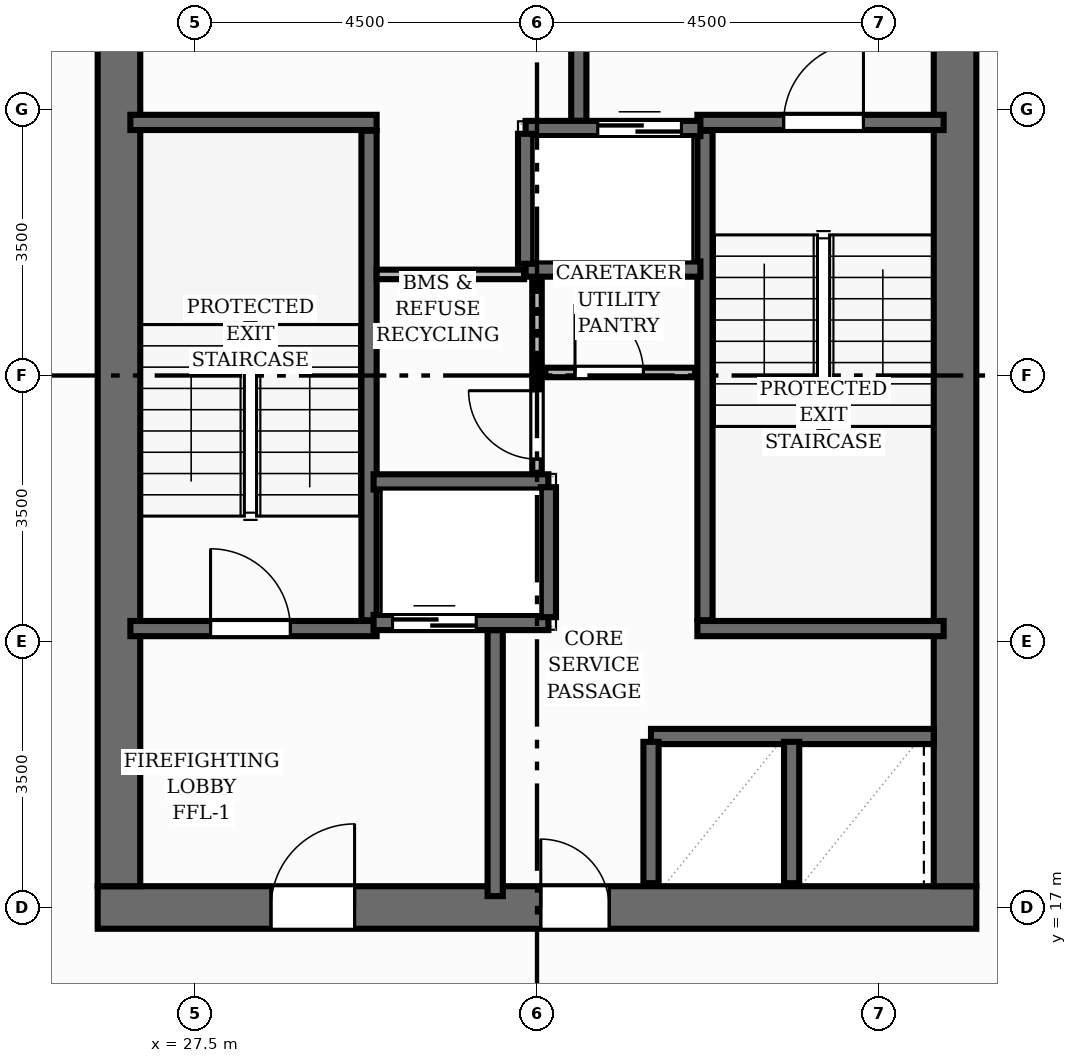
"""IFC4 building model, lengths in metres.
Left out: names, types, materials, properties, quantities, classifications, styles, units other than length and angle.
Written with IfcOpenShell. Run it as: python <this file> out.ifc"""

import sys

from ifc_helpers import new_model, si_unit, direction, frame, frame_2d, origin, place, context, subcontext, project, spatial, rectangle, extrude, element, fill, save


model = new_model("IFC4")
c1 = context("Model", 3, precision=1e-05, world=origin(), true_north=direction((0.0, 1.0)))
c2 = subcontext(c1, "Body", "Model", "MODEL_VIEW")
j1 = project(units=[si_unit("LENGTHUNIT", "METRE"), si_unit("PLANEANGLEUNIT", "RADIAN")], contexts=[c1])
p1 = place(None, origin())
s1 = spatial("IfcSite", under=j1, at=p1, CompositionType="ELEMENT")
p2 = place(p1, origin())
s2 = spatial("IfcBuilding", under=s1, at=p2, CompositionType="ELEMENT")
p3 = place(p2, frame((0.0, 0.0, 169.44)))
s3 = spatial("IfcBuildingStorey", under=s2, at=p3, CompositionType="ELEMENT", Elevation=169.44)
p4 = place(p3, frame((26.22, 17.0, 0.0), z_axis=(0.0, 0.0, 1.0), x_axis=(1.0, 0.0, 0.0)))
e1 = element("IfcWall", 1, at=p4, inside=s3, PredefinedType="SHEAR", context=c2, shape_type="SweptSolid", body=[
    extrude(rectangle(XDim=11.56, YDim=0.56, at=frame_2d((5.78, 0.0))), origin(), (0.0, 0.0, 1.0), 3.2),
])
p5 = place(p4, frame((2.28, 0.0, 0.0)))
e2 = element("IfcOpeningElement", 2, at=p5, cuts=e1, PredefinedType="OPENING", context=c2, shape_type="SweptSolid", body=[
    extrude(rectangle(XDim=1.1, YDim=2.15, at=frame_2d((0.55, 1.075))), frame((0.0, 0.29, 0.0), z_axis=(0.0, -1.0, 0.0), x_axis=(1.0, 0.0, 0.0)), (0.0, 0.0, 1.0), 0.58),
])
p6 = place(p4, frame((5.83, 0.0, 0.0)))
e3 = element("IfcOpeningElement", 3, at=p6, cuts=e1, PredefinedType="OPENING", context=c2, shape_type="SweptSolid", body=[
    extrude(rectangle(XDim=0.9, YDim=2.1, at=frame_2d((0.45, 1.05))), frame((0.0, 0.29, 0.0), z_axis=(0.0, -1.0, 0.0), x_axis=(1.0, 0.0, 0.0)), (0.0, 0.0, 1.0), 0.58),
])
for number, where, z_axis, x_axis in (
    (4, (26.5, 17.28, 0.0), (0.0, 0.0, 1.0), (0.0, 1.0, 0.0)),
    (5, (37.5, 17.28, 0.0), (0.0, 0.0, 1.0), (0.0, 1.0, 0.0)),
):
    element("IfcWall", number, at=place(p3, frame(where, z_axis=z_axis, x_axis=x_axis)), inside=s3, PredefinedType="SHEAR", context=c2, shape_type="SweptSolid", body=[
        extrude(rectangle(XDim=13.44, YDim=0.56, at=frame_2d((6.72, 0.0))), origin(), (0.0, 0.0, 1.0), 3.2),
    ])
p7 = place(p3, frame((29.79, 20.78, 0.0), z_axis=(0.0, 0.0, 1.0), x_axis=(0.0, 1.0, 0.0)))
e6 = element("IfcWall", 6, at=p7, inside=s3, PredefinedType="SHEAR", context=c2, shape_type="SweptSolid", body=[
    extrude(rectangle(XDim=6.44, YDim=0.2, at=frame_2d((3.22, 0.0))), origin(), (0.0, 0.0, 1.0), 3.2),
])
p8 = place(p3, frame((26.65, 27.33, 0.0), z_axis=(0.0, 0.0, 1.0), x_axis=(1.0, 0.0, 0.0)))
e7 = element("IfcWall", 7, at=p8, inside=s3, PredefinedType="SHEAR", context=c2, shape_type="SweptSolid", body=[
    extrude(rectangle(XDim=3.24, YDim=0.2, at=frame_2d((1.62, 0.0))), origin(), (0.0, 0.0, 1.0), 3.2),
])
p9 = place(p3, frame((26.65, 20.67, 0.0), z_axis=(0.0, 0.0, 1.0), x_axis=(1.0, 0.0, 0.0)))
e8 = element("IfcWall", 8, at=p9, inside=s3, PredefinedType="SHEAR", context=c2, shape_type="SweptSolid", body=[
    extrude(rectangle(XDim=3.24, YDim=0.2, at=frame_2d((1.62, 0.0))), origin(), (0.0, 0.0, 1.0), 3.2),
])
p10 = place(p9, frame((1.055, 0.0, 0.0)))
e9 = element("IfcOpeningElement", 9, at=p10, cuts=e8, PredefinedType="OPENING", context=c2, shape_type="SweptSolid", body=[
    extrude(rectangle(XDim=1.05, YDim=2.15, at=frame_2d((0.525, 1.075))), frame((0.0, 0.11, 0.0), z_axis=(0.0, -1.0, 0.0), x_axis=(1.0, 0.0, 0.0)), (0.0, 0.0, 1.0), 0.22),
])
p11 = place(p3, frame((34.21, 20.78, 0.0), z_axis=(0.0, 0.0, 1.0), x_axis=(0.0, 1.0, 0.0)))
e10 = element("IfcWall", 10, at=p11, inside=s3, PredefinedType="SHEAR", context=c2, shape_type="SweptSolid", body=[
    extrude(rectangle(XDim=6.44, YDim=0.2, at=frame_2d((3.22, 0.0))), origin(), (0.0, 0.0, 1.0), 3.2),
])
p12 = place(p3, frame((34.11, 20.67, 0.0), z_axis=(0.0, 0.0, 1.0), x_axis=(1.0, 0.0, 0.0)))
e11 = element("IfcWall", 11, at=p12, inside=s3, PredefinedType="SHEAR", context=c2, shape_type="SweptSolid", body=[
    extrude(rectangle(XDim=3.24, YDim=0.2, at=frame_2d((1.62, 0.0))), origin(), (0.0, 0.0, 1.0), 3.2),
])
p13 = place(p3, frame((34.11, 27.33, 0.0), z_axis=(0.0, 0.0, 1.0), x_axis=(1.0, 0.0, 0.0)))
e12 = element("IfcWall", 12, at=p13, inside=s3, PredefinedType="SHEAR", context=c2, shape_type="SweptSolid", body=[
    extrude(rectangle(XDim=3.24, YDim=0.2, at=frame_2d((1.62, 0.0))), origin(), (0.0, 0.0, 1.0), 3.2),
])
p14 = place(p13, frame((1.135, 0.0, 0.0)))
e13 = element("IfcOpeningElement", 13, at=p14, cuts=e12, PredefinedType="OPENING", context=c2, shape_type="SweptSolid", body=[
    extrude(rectangle(XDim=1.05, YDim=2.15, at=frame_2d((0.525, 1.075))), frame((0.0, 0.11, 0.0), z_axis=(0.0, -1.0, 0.0), x_axis=(1.0, 0.0, 0.0)), (0.0, 0.0, 1.0), 0.22),
])
for number, where, z_axis, x_axis in (
    (14, (31.45, 17.15, 0.0), (0.0, 0.0, 1.0), (0.0, 1.0, 0.0)),
    (15, (32.55, 27.35, 0.0), (0.0, 0.0, 1.0), (0.0, 1.0, 0.0)),
):
    element("IfcWall", number, at=place(p3, frame(where, z_axis=z_axis, x_axis=x_axis)), inside=s3, PredefinedType="SHEAR", context=c2, shape_type="SweptSolid", body=[
        extrude(rectangle(XDim=3.5, YDim=0.2, at=frame_2d((1.75, 0.0))), origin(), (0.0, 0.0, 1.0), 3.2),
    ])
p15 = place(p3, frame((29.85, 20.75, 0.0), z_axis=(0.0, 0.0, 1.0), x_axis=(1.0, 0.0, 0.0)))
e16 = element("IfcWall", 16, at=p15, inside=s3, PredefinedType="SHEAR", context=c2, shape_type="SweptSolid", body=[
    extrude(rectangle(XDim=2.3, YDim=0.2, at=frame_2d((1.15, 0.0))), origin(), (0.0, 0.0, 1.0), 3.2),
])
p16 = place(p15, frame((0.25, 0.0, 0.0)))
e17 = element("IfcOpeningElement", 17, at=p16, cuts=e16, PredefinedType="OPENING", context=c2, shape_type="SweptSolid", body=[
    extrude(rectangle(XDim=1.1, YDim=2.15, at=frame_2d((0.55, 1.075))), frame((0.0, 0.11, 0.0), z_axis=(0.0, -1.0, 0.0), x_axis=(1.0, 0.0, 0.0)), (0.0, 0.0, 1.0), 0.22),
])
p17 = place(p3, frame((29.85, 22.6, 0.0), z_axis=(0.0, 0.0, 1.0), x_axis=(1.0, 0.0, 0.0)))
e18 = element("IfcWall", 18, at=p17, inside=s3, PredefinedType="SHEAR", context=c2, shape_type="SweptSolid", body=[
    extrude(rectangle(XDim=2.3, YDim=0.2, at=frame_2d((1.15, 0.0))), origin(), (0.0, 0.0, 1.0), 3.2),
])
p18 = place(p3, frame((32.15, 20.82, 0.0), z_axis=(0.0, 0.0, 1.0), x_axis=(0.0, 1.0, 0.0)))
e19 = element("IfcWall", 19, at=p18, inside=s3, PredefinedType="SHEAR", context=c2, shape_type="SweptSolid", body=[
    extrude(rectangle(XDim=1.71, YDim=0.2, at=frame_2d((0.855, 0.0))), origin(), (0.0, 0.0, 1.0), 3.2),
])
p19 = place(p3, frame((31.85, 27.25, 0.0), z_axis=(0.0, 0.0, 1.0), x_axis=(1.0, 0.0, 0.0)))
e20 = element("IfcWall", 20, at=p19, inside=s3, PredefinedType="SHEAR", context=c2, shape_type="SweptSolid", body=[
    extrude(rectangle(XDim=2.3, YDim=0.2, at=frame_2d((1.15, 0.0))), origin(), (0.0, 0.0, 1.0), 3.2),
])
p20 = place(p19, frame((0.95, 0.0, 0.0)))
e21 = element("IfcOpeningElement", 21, at=p20, cuts=e20, PredefinedType="OPENING", context=c2, shape_type="SweptSolid", body=[
    extrude(rectangle(XDim=1.1, YDim=2.15, at=frame_2d((0.55, 1.075))), frame((0.0, 0.11, 0.0), z_axis=(0.0, -1.0, 0.0), x_axis=(1.0, 0.0, 0.0)), (0.0, 0.0, 1.0), 0.22),
])
p21 = place(p3, frame((31.85, 25.4, 0.0), z_axis=(0.0, 0.0, 1.0), x_axis=(1.0, 0.0, 0.0)))
e22 = element("IfcWall", 22, at=p21, inside=s3, PredefinedType="SHEAR", context=c2, shape_type="SweptSolid", body=[
    extrude(rectangle(XDim=2.3, YDim=0.2, at=frame_2d((1.15, 0.0))), origin(), (0.0, 0.0, 1.0), 3.2),
])
p22 = place(p3, frame((31.85, 25.47, 0.0), z_axis=(0.0, 0.0, 1.0), x_axis=(0.0, 1.0, 0.0)))
e23 = element("IfcWall", 23, at=p22, inside=s3, PredefinedType="SHEAR", context=c2, shape_type="SweptSolid", body=[
    extrude(rectangle(XDim=1.71, YDim=0.2, at=frame_2d((0.855, 0.0))), origin(), (0.0, 0.0, 1.0), 3.2),
])
p23 = place(p3, frame((33.5, 19.25, 0.0), z_axis=(0.0, 0.0, 1.0), x_axis=(1.0, 0.0, 0.0)))
e24 = element("IfcWall", 24, at=p23, inside=s3, PredefinedType="SHEAR", context=c2, shape_type="SweptSolid", body=[
    extrude(rectangle(XDim=3.72, YDim=0.2, at=frame_2d((1.86, 0.0))), origin(), (0.0, 0.0, 1.0), 3.2),
])
for number, where, z_axis, x_axis in (
    (25, (33.5, 17.32, 0.0), (0.0, 0.0, 1.0), (0.0, 1.0, 0.0)),
    (26, (35.35, 17.32, 0.0), (0.0, 0.0, 1.0), (0.0, 1.0, 0.0)),
):
    element("IfcWall", number, at=place(p3, frame(where, z_axis=z_axis, x_axis=x_axis)), inside=s3, PredefinedType="SHEAR", context=c2, shape_type="SweptSolid", body=[
        extrude(rectangle(XDim=1.86, YDim=0.2, at=frame_2d((0.93, 0.0))), origin(), (0.0, 0.0, 1.0), 3.2),
    ])
p24 = place(p3, frame((32.0, 22.72, 0.0), z_axis=(0.0, 0.0, 1.0), x_axis=(0.0, 1.0, 0.0)))
e27 = element("IfcWall", 27, at=p24, inside=s3, PredefinedType="PARTITIONING", context=c2, shape_type="SweptSolid", body=[
    extrude(rectangle(XDim=2.52, YDim=0.125, at=frame_2d((1.26, 0.0))), origin(), (0.0, 0.0, 1.0), 2.955),
])
p25 = place(p24, frame((0.18, 0.0, 0.0)))
e28 = element("IfcOpeningElement", 28, at=p25, cuts=e27, PredefinedType="OPENING", context=c2, shape_type="SweptSolid", body=[
    extrude(rectangle(XDim=0.9, YDim=2.1, at=frame_2d((0.45, 1.05))), frame((0.0, 0.073, 0.0), z_axis=(0.0, -1.0, 0.0), x_axis=(1.0, 0.0, 0.0)), (0.0, 0.0, 1.0), 0.145),
])
p26 = place(p3, frame((32.11, 24.04, 0.0), z_axis=(0.0, 0.0, 1.0), x_axis=(1.0, 0.0, 0.0)))
e29 = element("IfcWall", 29, at=p26, inside=s3, PredefinedType="PARTITIONING", context=c2, shape_type="SweptSolid", body=[
    extrude(rectangle(XDim=1.97, YDim=0.125, at=frame_2d((0.985, 0.0))), origin(), (0.0, 0.0, 1.0), 2.955),
])
p27 = place(p26, frame((0.39, 0.0, 0.0)))
e30 = element("IfcOpeningElement", 30, at=p27, cuts=e29, PredefinedType="OPENING", context=c2, shape_type="SweptSolid", body=[
    extrude(rectangle(XDim=0.9, YDim=2.1, at=frame_2d((0.45, 1.05))), frame((0.0, 0.073, 0.0), z_axis=(0.0, -1.0, 0.0), x_axis=(1.0, 0.0, 0.0)), (0.0, 0.0, 1.0), 0.145),
])
p28 = place(p3, frame((29.89, 25.33, 0.0), z_axis=(0.0, 0.0, 1.0), x_axis=(1.0, 0.0, 0.0)))
e31 = element("IfcWall", 31, at=p28, inside=s3, PredefinedType="PARTITIONING", context=c2, shape_type="SweptSolid", body=[
    extrude(rectangle(XDim=1.94, YDim=0.125, at=frame_2d((0.97, 0.0))), origin(), (0.0, 0.0, 1.0), 2.955),
])
p29 = place(p10, origin())
e32 = element("IfcDoor", 32, at=p29, inside=s3, OperationType="SINGLE_SWING_LEFT", PredefinedType="DOOR", context=c2, shape_type="SweptSolid", body=[
    extrude(rectangle(XDim=1.05, YDim=2.15, at=frame_2d((0.525, 1.075))), frame((0.0, 0.025, 0.0), z_axis=(0.0, -1.0, 0.0), x_axis=(1.0, 0.0, 0.0)), (0.0, 0.0, 1.0), 0.05),
])
fill(e9, e32)
p30 = place(p14, origin())
e33 = element("IfcDoor", 33, at=p30, inside=s3, OperationType="SINGLE_SWING_RIGHT", PredefinedType="DOOR", context=c2, shape_type="SweptSolid", body=[
    extrude(rectangle(XDim=1.05, YDim=2.15, at=frame_2d((0.525, 1.075))), frame((0.0, 0.025, 0.0), z_axis=(0.0, -1.0, 0.0), x_axis=(1.0, 0.0, 0.0)), (0.0, 0.0, 1.0), 0.05),
])
fill(e13, e33)
p31 = place(p5, origin())
e34 = element("IfcDoor", 34, at=p31, inside=s3, OperationType="SINGLE_SWING_RIGHT", PredefinedType="DOOR", context=c2, shape_type="SweptSolid", body=[
    extrude(rectangle(XDim=1.1, YDim=2.15, at=frame_2d((0.55, 1.075))), frame((0.0, 0.025, 0.0), z_axis=(0.0, -1.0, 0.0), x_axis=(1.0, 0.0, 0.0)), (0.0, 0.0, 1.0), 0.05),
])
fill(e2, e34)
p32 = place(p16, origin())
e35 = element("IfcDoor", 35, at=p32, inside=s3, OperationType="DOUBLE_DOOR_SLIDING", PredefinedType="DOOR", context=c2, shape_type="SweptSolid", body=[
    extrude(rectangle(XDim=1.1, YDim=2.15, at=frame_2d((0.55, 1.075))), frame((0.0, 0.025, 0.0), z_axis=(0.0, -1.0, 0.0), x_axis=(1.0, 0.0, 0.0)), (0.0, 0.0, 1.0), 0.05),
])
fill(e17, e35)
p33 = place(p20, origin())
e36 = element("IfcDoor", 36, at=p33, inside=s3, OperationType="DOUBLE_DOOR_SLIDING", PredefinedType="DOOR", context=c2, shape_type="SweptSolid", body=[
    extrude(rectangle(XDim=1.1, YDim=2.15, at=frame_2d((0.55, 1.075))), frame((0.0, 0.025, 0.0), z_axis=(0.0, -1.0, 0.0), x_axis=(1.0, 0.0, 0.0)), (0.0, 0.0, 1.0), 0.05),
])
fill(e21, e36)
p34 = place(p6, origin())
e37 = element("IfcDoor", 37, at=p34, inside=s3, OperationType="SINGLE_SWING_LEFT", PredefinedType="DOOR", context=c2, shape_type="SweptSolid", body=[
    extrude(rectangle(XDim=0.9, YDim=2.1, at=frame_2d((0.45, 1.05))), frame((0.0, 0.025, 0.0), z_axis=(0.0, -1.0, 0.0), x_axis=(1.0, 0.0, 0.0)), (0.0, 0.0, 1.0), 0.05),
])
fill(e3, e37)
p35 = place(p27, origin())
e38 = element("IfcDoor", 38, at=p35, inside=s3, OperationType="SINGLE_SWING_LEFT", PredefinedType="DOOR", context=c2, shape_type="SweptSolid", body=[
    extrude(rectangle(XDim=0.9, YDim=2.1, at=frame_2d((0.45, 1.05))), frame((0.0, 0.025, 0.0), z_axis=(0.0, -1.0, 0.0), x_axis=(1.0, 0.0, 0.0)), (0.0, 0.0, 1.0), 0.05),
])
fill(e30, e38)
p36 = place(p25, origin())
e39 = element("IfcDoor", 39, at=p36, inside=s3, OperationType="SINGLE_SWING_RIGHT", PredefinedType="DOOR", context=c2, shape_type="SweptSolid", body=[
    extrude(rectangle(XDim=0.9, YDim=2.1, at=frame_2d((0.45, 1.05))), frame((0.0, 0.025, 0.0), z_axis=(0.0, -1.0, 0.0), x_axis=(1.0, 0.0, 0.0)), (0.0, 0.0, 1.0), 0.05),
])
fill(e28, e39)
save(model, sys.argv[1])
